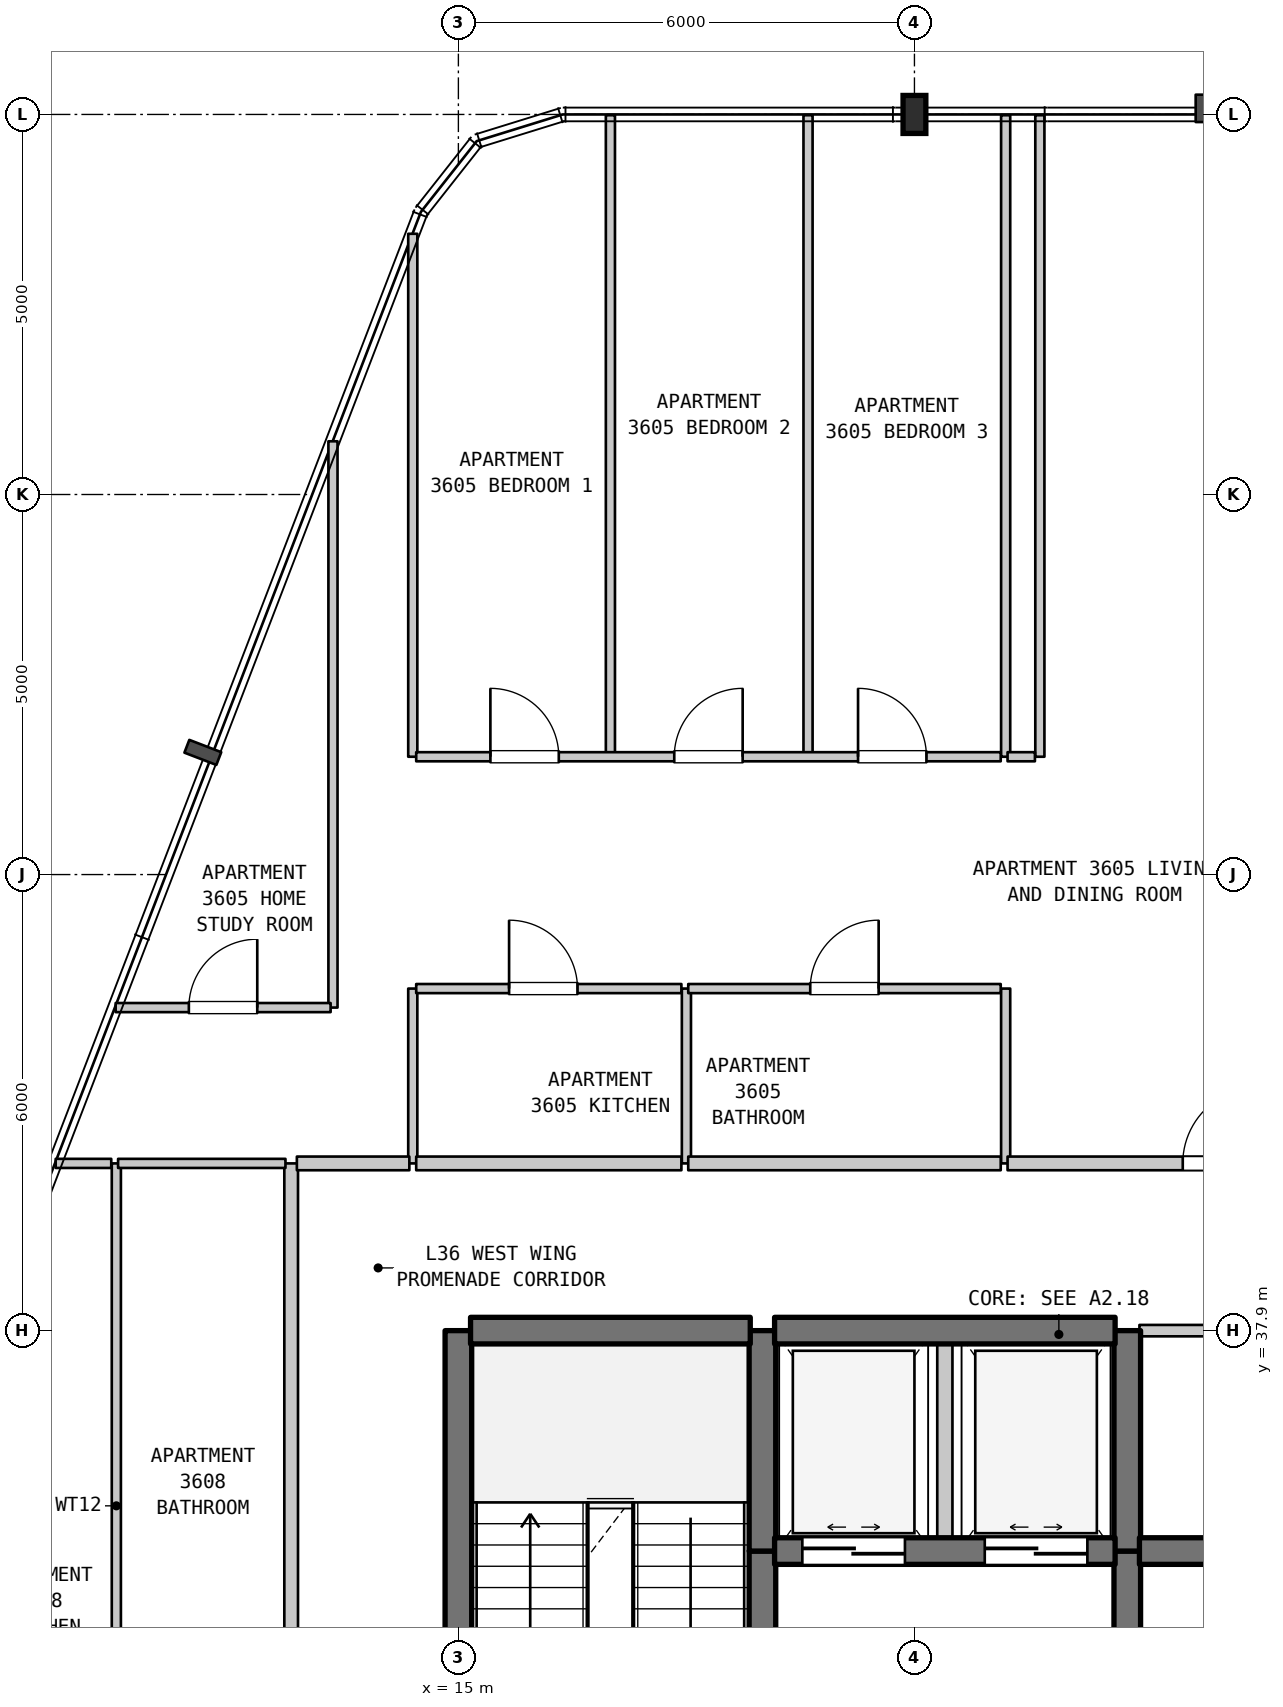
"""IFC4 building model, lengths in metres.
Left out: names, types, materials, properties, quantities, classifications, styles, units other than length and angle.
Written with IfcOpenShell. Run it as: python <this file> out.ifc"""

import sys

from ifc_helpers import new_model, si_unit, direction, frame, frame_2d, origin, origin_2d, place, context, subcontext, project, spatial, rectangle, i_section, extrude, element, fill, save


model = new_model("IFC4")
c1 = context("Model", 3, precision=1e-05, world=origin(), true_north=direction((0.0, 1.0)))
c2 = subcontext(c1, "Body", "Model", "MODEL_VIEW")
j1 = project(units=[si_unit("LENGTHUNIT", "METRE"), si_unit("PLANEANGLEUNIT", "RADIAN")], contexts=[c1])
p1 = place(None, origin())
s1 = spatial("IfcSite", under=j1, at=p1, CompositionType="ELEMENT")
p2 = place(p1, origin())
s2 = spatial("IfcBuilding", under=s1, at=p2, CompositionType="ELEMENT")
p3 = place(p2, frame((0.0, 0.0, 148.3)))
s3 = spatial("IfcBuildingStorey", under=s2, at=p3, CompositionType="ELEMENT", Elevation=148.3)
p4 = place(p3, frame((21.0, 53.9, 0.0), z_axis=(0.0, 0.0, 1.0), x_axis=(1.0, 0.0, 0.0)))
e1 = element("IfcColumn", 1, at=p4, inside=s3, PredefinedType="COLUMN", context=c2, shape_type="SweptSolid", body=[
    extrude(i_section(OverallWidth=0.3, OverallDepth=0.5, WebThickness=0.014, FlangeThickness=0.028, FilletRadius=0.027, at=origin_2d()), origin(), (0.0, 0.0, 1.0), 3.7),
])
p5 = place(p3, frame((10.5, 31.09, 0.0), z_axis=(0.0, 0.0, 1.0), x_axis=(0.0, 1.0, 0.0)))
e2 = element("IfcWall", 2, at=p5, inside=s3, PredefinedType="PARTITIONING", context=c2, shape_type="SweptSolid", body=[
    extrude(rectangle(XDim=9.01, YDim=0.12, at=frame_2d((4.505, 0.0))), origin(), (0.0, 0.0, 1.0), 3.385),
])
p6 = place(p3, frame((12.8, 31.09, 0.0), z_axis=(0.0, 0.0, 1.0), x_axis=(0.0, 1.0, 0.0)))
e3 = element("IfcWall", 3, at=p6, inside=s3, PredefinedType="STANDARD", context=c2, shape_type="SweptSolid", body=[
    extrude(rectangle(XDim=9.01, YDim=0.18, at=frame_2d((4.505, 0.0))), origin(), (0.0, 0.0, 1.0), 3.385),
])
p7 = place(p3, frame((13.35, 42.15, 0.0), z_axis=(0.0, 0.0, 1.0), x_axis=(0.0, 1.0, 0.0)))
e4 = element("IfcWall", 4, at=p7, inside=s3, PredefinedType="PARTITIONING", context=c2, shape_type="SweptSolid", body=[
    extrude(rectangle(XDim=7.45, YDim=0.12, at=frame_2d((3.725, 0.0))), origin(), (0.0, 0.0, 1.0), 3.385),
])
p8 = place(p3, frame((14.4, 40.1, 0.0), z_axis=(0.0, 0.0, 1.0), x_axis=(0.0, 1.0, 0.0)))
e5 = element("IfcWall", 5, at=p8, inside=s3, PredefinedType="PARTITIONING", context=c2, shape_type="SweptSolid", body=[
    extrude(rectangle(XDim=2.3, YDim=0.12, at=frame_2d((1.15, 0.0))), origin(), (0.0, 0.0, 1.0), 3.385),
])
p9 = place(p3, frame((14.4, 45.45, 0.0), z_axis=(0.0, 0.0, 1.0), x_axis=(0.0, 1.0, 0.0)))
e6 = element("IfcWall", 6, at=p9, inside=s3, PredefinedType="PARTITIONING", context=c2, shape_type="SweptSolid", body=[
    extrude(rectangle(XDim=6.88, YDim=0.12, at=frame_2d((3.44, 0.0))), origin(), (0.0, 0.0, 1.0), 3.385),
])
p10 = place(p3, frame((15.0, 31.1, 0.0), z_axis=(0.0, 0.0, 1.0), x_axis=(0.0, 1.0, 0.0)))
e7 = element("IfcWall", 7, at=p10, inside=s3, PredefinedType="SHEAR", context=c2, shape_type="SweptSolid", body=[
    extrude(rectangle(XDim=6.8, YDim=0.35, at=frame_2d((3.4, 0.0))), origin(), (0.0, 0.0, 1.0), 3.385),
])
p11 = place(p3, frame((17.0, 45.45, 0.0), z_axis=(0.0, 0.0, 1.0), x_axis=(0.0, 1.0, 0.0)))
e8 = element("IfcWall", 8, at=p11, inside=s3, PredefinedType="PARTITIONING", context=c2, shape_type="SweptSolid", body=[
    extrude(rectangle(XDim=8.44, YDim=0.12, at=frame_2d((4.22, 0.0))), origin(), (0.0, 0.0, 1.0), 3.385),
])
p12 = place(p3, frame((18.0, 40.1, 0.0), z_axis=(0.0, 0.0, 1.0), x_axis=(0.0, 1.0, 0.0)))
e9 = element("IfcWall", 9, at=p12, inside=s3, PredefinedType="PARTITIONING", context=c2, shape_type="SweptSolid", body=[
    extrude(rectangle(XDim=2.3, YDim=0.12, at=frame_2d((1.15, 0.0))), origin(), (0.0, 0.0, 1.0), 3.385),
])
p13 = place(p3, frame((19.0, 29.5, 0.0), z_axis=(0.0, 0.0, 1.0), x_axis=(0.0, 1.0, 0.0)))
e10 = element("IfcWall", 10, at=p13, inside=s3, PredefinedType="SHEAR", context=c2, shape_type="SweptSolid", body=[
    extrude(rectangle(XDim=5.5, YDim=0.35, at=frame_2d((2.75, 0.0))), origin(), (0.0, 0.0, 1.0), 3.385),
])
p14 = place(p13, frame((2.025, 0.0, 0.0)))
e11 = element("IfcOpeningElement", 11, at=p14, cuts=e10, PredefinedType="OPENING", context=c2, shape_type="SweptSolid", body=[
    extrude(rectangle(XDim=1.1, YDim=2.15, at=frame_2d((0.55, 1.075))), frame((0.0, 0.185, 0.0), z_axis=(0.0, -1.0, 0.0), x_axis=(1.0, 0.0, 0.0)), (0.0, 0.0, 1.0), 0.37),
])
p15 = place(p3, frame((19.0, 35.0, 0.0), z_axis=(0.0, 0.0, 1.0), x_axis=(0.0, 1.0, 0.0)))
e12 = element("IfcWall", 12, at=p15, inside=s3, PredefinedType="SHEAR", context=c2, shape_type="SweptSolid", body=[
    extrude(rectangle(XDim=2.9, YDim=0.35, at=frame_2d((1.45, 0.0))), origin(), (0.0, 0.0, 1.0), 3.385),
])
p16 = place(p3, frame((19.6, 45.45, 0.0), z_axis=(0.0, 0.0, 1.0), x_axis=(0.0, 1.0, 0.0)))
e13 = element("IfcWall", 13, at=p16, inside=s3, PredefinedType="PARTITIONING", context=c2, shape_type="SweptSolid", body=[
    extrude(rectangle(XDim=8.44, YDim=0.12, at=frame_2d((4.22, 0.0))), origin(), (0.0, 0.0, 1.0), 3.385),
])
p17 = place(p3, frame((21.4, 35.0, 0.0), z_axis=(0.0, 0.0, 1.0), x_axis=(0.0, 1.0, 0.0)))
e14 = element("IfcWall", 14, at=p17, inside=s3, PredefinedType="STANDARD", context=c2, shape_type="SweptSolid", body=[
    extrude(rectangle(XDim=2.9, YDim=0.2, at=frame_2d((1.45, 0.0))), origin(), (0.0, 0.0, 1.0), 3.385),
])
p18 = place(p3, frame((22.2, 40.1, 0.0), z_axis=(0.0, 0.0, 1.0), x_axis=(0.0, 1.0, 0.0)))
e15 = element("IfcWall", 15, at=p18, inside=s3, PredefinedType="PARTITIONING", context=c2, shape_type="SweptSolid", body=[
    extrude(rectangle(XDim=2.3, YDim=0.12, at=frame_2d((1.15, 0.0))), origin(), (0.0, 0.0, 1.0), 3.385),
])
for number, where, z_axis, x_axis in (
    (16, (22.2, 45.45, 0.0), (0.0, 0.0, 1.0), (0.0, 1.0, 0.0)),
    (17, (22.65, 45.45, 0.0), (0.0, 0.0, 1.0), (0.0, 1.0, 0.0)),
):
    element("IfcWall", number, at=place(p3, frame(where, z_axis=z_axis, x_axis=x_axis)), inside=s3, PredefinedType="PARTITIONING", context=c2, shape_type="SweptSolid", body=[
        extrude(rectangle(XDim=8.44, YDim=0.12, at=frame_2d((4.22, 0.0))), origin(), (0.0, 0.0, 1.0), 3.385),
    ])
p19 = place(p3, frame((23.8, 31.5, 0.0), z_axis=(0.0, 0.0, 1.0), x_axis=(0.0, 1.0, 0.0)))
e18 = element("IfcWall", 18, at=p19, inside=s3, PredefinedType="SHEAR", context=c2, shape_type="SweptSolid", body=[
    extrude(rectangle(XDim=3.5, YDim=0.35, at=frame_2d((1.75, 0.0))), origin(), (0.0, 0.0, 1.0), 3.385),
])
p20 = place(p19, frame((1.127, 0.0, 0.0)))
e19 = element("IfcOpeningElement", 19, at=p20, cuts=e18, PredefinedType="OPENING", context=c2, shape_type="SweptSolid", body=[
    extrude(rectangle(XDim=1.1, YDim=2.15, at=frame_2d((0.55, 1.075))), frame((0.0, 0.185, 0.0), z_axis=(0.0, -1.0, 0.0), x_axis=(1.0, 0.0, 0.0)), (0.0, 0.0, 1.0), 0.37),
])
p21 = place(p3, frame((23.8, 35.0, 0.0), z_axis=(0.0, 0.0, 1.0), x_axis=(0.0, 1.0, 0.0)))
e20 = element("IfcWall", 20, at=p21, inside=s3, PredefinedType="SHEAR", context=c2, shape_type="SweptSolid", body=[
    extrude(rectangle(XDim=2.9, YDim=0.35, at=frame_2d((1.45, 0.0))), origin(), (0.0, 0.0, 1.0), 3.385),
])
p22 = place(p3, frame((19.16, 35.0, 0.0), z_axis=(0.0, 0.0, 1.0), x_axis=(1.0, 0.0, 0.0)))
e21 = element("IfcWall", 21, at=p22, inside=s3, PredefinedType="SHEAR", context=c2, shape_type="SweptSolid", body=[
    extrude(rectangle(XDim=4.48, YDim=0.35, at=frame_2d((2.24, 0.0))), origin(), (0.0, 0.0, 1.0), 3.385),
])
p23 = place(p22, frame((0.365, 0.0, 0.0)))
e22 = element("IfcOpeningElement", 22, at=p23, cuts=e21, PredefinedType="OPENING", context=c2, shape_type="SweptSolid", body=[
    extrude(rectangle(XDim=1.35, YDim=2.2, at=frame_2d((0.675, 1.1))), frame((0.0, 0.185, 0.0), z_axis=(0.0, -1.0, 0.0), x_axis=(1.0, 0.0, 0.0)), (0.0, 0.0, 1.0), 0.37),
])
p24 = place(p22, frame((2.765, 0.0, 0.0)))
e23 = element("IfcOpeningElement", 23, at=p24, cuts=e21, PredefinedType="OPENING", context=c2, shape_type="SweptSolid", body=[
    extrude(rectangle(XDim=1.35, YDim=2.2, at=frame_2d((0.675, 1.1))), frame((0.0, 0.185, 0.0), z_axis=(0.0, -1.0, 0.0), x_axis=(1.0, 0.0, 0.0)), (0.0, 0.0, 1.0), 0.37),
])
p25 = place(p3, frame((23.96, 35.0, 0.0), z_axis=(0.0, 0.0, 1.0), x_axis=(1.0, 0.0, 0.0)))
e24 = element("IfcWall", 24, at=p25, inside=s3, PredefinedType="SHEAR", context=c2, shape_type="SweptSolid", body=[
    extrude(rectangle(XDim=3.995, YDim=0.35, at=frame_2d((1.998, 0.0))), origin(), (0.0, 0.0, 1.0), 3.385),
])
p26 = place(p25, frame((1.393, 0.0, 0.0)))
e25 = element("IfcOpeningElement", 25, at=p26, cuts=e24, PredefinedType="OPENING", context=c2, shape_type="SweptSolid", body=[
    extrude(rectangle(XDim=0.95, YDim=2.15, at=frame_2d((0.475, 1.075))), frame((0.0, 0.185, 0.0), z_axis=(0.0, -1.0, 0.0), x_axis=(1.0, 0.0, 0.0)), (0.0, 0.0, 1.0), 0.37),
])
p27 = place(p3, frame((15.16, 37.9, 0.0), z_axis=(0.0, 0.0, 1.0), x_axis=(1.0, 0.0, 0.0)))
e26 = element("IfcWall", 26, at=p27, inside=s3, PredefinedType="SHEAR", context=c2, shape_type="SweptSolid", body=[
    extrude(rectangle(XDim=3.68, YDim=0.35, at=frame_2d((1.84, 0.0))), origin(), (0.0, 0.0, 1.0), 3.385),
])
p28 = place(p3, frame((19.16, 37.9, 0.0), z_axis=(0.0, 0.0, 1.0), x_axis=(1.0, 0.0, 0.0)))
e27 = element("IfcWall", 27, at=p28, inside=s3, PredefinedType="SHEAR", context=c2, shape_type="SweptSolid", body=[
    extrude(rectangle(XDim=4.48, YDim=0.35, at=frame_2d((2.24, 0.0))), origin(), (0.0, 0.0, 1.0), 3.385),
])
p29 = place(p3, frame((23.96, 37.9, 0.0), z_axis=(0.0, 0.0, 1.0), x_axis=(1.0, 0.0, 0.0)))
e28 = element("IfcWall", 28, at=p29, inside=s3, PredefinedType="STANDARD", context=c2, shape_type="SweptSolid", body=[
    extrude(rectangle(XDim=3.995, YDim=0.15, at=frame_2d((1.998, 0.0))), origin(), (0.0, 0.0, 1.0), 2.885),
])
p30 = place(p3, frame((9.702, 40.1, 0.0), z_axis=(0.0, 0.0, 1.0), x_axis=(1.0, 0.0, 0.0)))
e29 = element("IfcWall", 29, at=p30, inside=s3, PredefinedType="PARTITIONING", context=c2, shape_type="SweptSolid", body=[
    extrude(rectangle(XDim=0.731, YDim=0.12, at=frame_2d((0.366, 0.0))), origin(), (0.0, 0.0, 1.0), 3.385),
])
p31 = place(p3, frame((10.523, 40.1, 0.0), z_axis=(0.0, 0.0, 1.0), x_axis=(1.0, 0.0, 0.0)))
e30 = element("IfcWall", 30, at=p31, inside=s3, PredefinedType="PARTITIONING", context=c2, shape_type="SweptSolid", body=[
    extrude(rectangle(XDim=2.202, YDim=0.12, at=frame_2d((1.101, 0.0))), origin(), (0.0, 0.0, 1.0), 3.385),
])
p32 = place(p3, frame((12.875, 40.1, 0.0), z_axis=(0.0, 0.0, 1.0), x_axis=(1.0, 0.0, 0.0)))
e31 = element("IfcWall", 31, at=p32, inside=s3, PredefinedType="STANDARD", context=c2, shape_type="SweptSolid", body=[
    extrude(rectangle(XDim=1.48, YDim=0.18, at=frame_2d((0.74, 0.0))), origin(), (0.0, 0.0, 1.0), 3.385),
])
p33 = place(p3, frame((14.445, 40.1, 0.0), z_axis=(0.0, 0.0, 1.0), x_axis=(1.0, 0.0, 0.0)))
e32 = element("IfcWall", 32, at=p33, inside=s3, PredefinedType="STANDARD", context=c2, shape_type="SweptSolid", body=[
    extrude(rectangle(XDim=3.489, YDim=0.18, at=frame_2d((1.745, 0.0))), origin(), (0.0, 0.0, 1.0), 3.385),
])
p34 = place(p3, frame((18.024, 40.1, 0.0), z_axis=(0.0, 0.0, 1.0), x_axis=(1.0, 0.0, 0.0)))
e33 = element("IfcWall", 33, at=p34, inside=s3, PredefinedType="STANDARD", context=c2, shape_type="SweptSolid", body=[
    extrude(rectangle(XDim=4.111, YDim=0.18, at=frame_2d((2.056, 0.0))), origin(), (0.0, 0.0, 1.0), 3.385),
])
p35 = place(p3, frame((22.225, 40.1, 0.0), z_axis=(0.0, 0.0, 1.0), x_axis=(1.0, 0.0, 0.0)))
e34 = element("IfcWall", 34, at=p35, inside=s3, PredefinedType="STANDARD", context=c2, shape_type="SweptSolid", body=[
    extrude(rectangle(XDim=10.345, YDim=0.18, at=frame_2d((5.172, 0.0))), origin(), (0.0, 0.0, 1.0), 3.385),
])
p36 = place(p35, frame((2.305, 0.0, 0.0)))
e35 = element("IfcOpeningElement", 35, at=p36, cuts=e34, PredefinedType="OPENING", context=c2, shape_type="SweptSolid", body=[
    extrude(rectangle(XDim=1.0, YDim=2.15, at=frame_2d((0.5, 1.075))), frame((0.0, 0.1, 0.0), z_axis=(0.0, -1.0, 0.0), x_axis=(1.0, 0.0, 0.0)), (0.0, 0.0, 1.0), 0.2),
])
p37 = place(p35, frame((7.235, 0.0, 0.0)))
e36 = element("IfcOpeningElement", 36, at=p37, cuts=e34, PredefinedType="OPENING", context=c2, shape_type="SweptSolid", body=[
    extrude(rectangle(XDim=1.0, YDim=2.15, at=frame_2d((0.5, 1.075))), frame((0.0, 0.1, 0.0), z_axis=(0.0, -1.0, 0.0), x_axis=(1.0, 0.0, 0.0)), (0.0, 0.0, 1.0), 0.2),
])
p38 = place(p3, frame((10.491, 42.15, 0.0), z_axis=(0.0, 0.0, 1.0), x_axis=(1.0, 0.0, 0.0)))
e37 = element("IfcWall", 37, at=p38, inside=s3, PredefinedType="PARTITIONING", context=c2, shape_type="SweptSolid", body=[
    extrude(rectangle(XDim=2.828, YDim=0.12, at=frame_2d((1.414, 0.0))), origin(), (0.0, 0.0, 1.0), 3.385),
])
p39 = place(p38, frame((0.963, 0.0, 0.0)))
e38 = element("IfcOpeningElement", 38, at=p39, cuts=e37, PredefinedType="OPENING", context=c2, shape_type="SweptSolid", body=[
    extrude(rectangle(XDim=0.9, YDim=2.15, at=frame_2d((0.45, 1.075))), frame((0.0, 0.07, 0.0), z_axis=(0.0, -1.0, 0.0), x_axis=(1.0, 0.0, 0.0)), (0.0, 0.0, 1.0), 0.14),
])
p40 = place(p3, frame((14.445, 42.4, 0.0), z_axis=(0.0, 0.0, 1.0), x_axis=(1.0, 0.0, 0.0)))
e39 = element("IfcWall", 39, at=p40, inside=s3, PredefinedType="PARTITIONING", context=c2, shape_type="SweptSolid", body=[
    extrude(rectangle(XDim=3.489, YDim=0.12, at=frame_2d((1.745, 0.0))), origin(), (0.0, 0.0, 1.0), 3.385),
])
p41 = place(p40, frame((1.222, 0.0, 0.0)))
e40 = element("IfcOpeningElement", 40, at=p41, cuts=e39, PredefinedType="OPENING", context=c2, shape_type="SweptSolid", body=[
    extrude(rectangle(XDim=0.9, YDim=2.15, at=frame_2d((0.45, 1.075))), frame((0.0, 0.07, 0.0), z_axis=(0.0, -1.0, 0.0), x_axis=(1.0, 0.0, 0.0)), (0.0, 0.0, 1.0), 0.14),
])
p42 = place(p3, frame((18.024, 42.4, 0.0), z_axis=(0.0, 0.0, 1.0), x_axis=(1.0, 0.0, 0.0)))
e41 = element("IfcWall", 41, at=p42, inside=s3, PredefinedType="PARTITIONING", context=c2, shape_type="SweptSolid", body=[
    extrude(rectangle(XDim=4.111, YDim=0.12, at=frame_2d((2.056, 0.0))), origin(), (0.0, 0.0, 1.0), 3.385),
])
p43 = place(p42, frame((1.605, 0.0, 0.0)))
e42 = element("IfcOpeningElement", 42, at=p43, cuts=e41, PredefinedType="OPENING", context=c2, shape_type="SweptSolid", body=[
    extrude(rectangle(XDim=0.9, YDim=2.1, at=frame_2d((0.45, 1.05))), frame((0.0, 0.07, 0.0), z_axis=(0.0, -1.0, 0.0), x_axis=(1.0, 0.0, 0.0)), (0.0, 0.0, 1.0), 0.14),
])
p44 = place(p3, frame((14.445, 45.45, 0.0), z_axis=(0.0, 0.0, 1.0), x_axis=(1.0, 0.0, 0.0)))
e43 = element("IfcWall", 43, at=p44, inside=s3, PredefinedType="PARTITIONING", context=c2, shape_type="SweptSolid", body=[
    extrude(rectangle(XDim=7.69, YDim=0.12, at=frame_2d((3.845, 0.0))), origin(), (0.0, 0.0, 1.0), 3.385),
])
p45 = place(p44, frame((0.976, 0.0, 0.0)))
e44 = element("IfcOpeningElement", 44, at=p45, cuts=e43, PredefinedType="OPENING", context=c2, shape_type="SweptSolid", body=[
    extrude(rectangle(XDim=0.9, YDim=2.15, at=frame_2d((0.45, 1.075))), frame((0.0, 0.07, 0.0), z_axis=(0.0, -1.0, 0.0), x_axis=(1.0, 0.0, 0.0)), (0.0, 0.0, 1.0), 0.14),
])
p46 = place(p44, frame((3.395, 0.0, 0.0)))
e45 = element("IfcOpeningElement", 45, at=p46, cuts=e43, PredefinedType="OPENING", context=c2, shape_type="SweptSolid", body=[
    extrude(rectangle(XDim=0.9, YDim=2.15, at=frame_2d((0.45, 1.075))), frame((0.0, 0.07, 0.0), z_axis=(0.0, -1.0, 0.0), x_axis=(1.0, 0.0, 0.0)), (0.0, 0.0, 1.0), 0.14),
])
p47 = place(p44, frame((5.813, 0.0, 0.0)))
e46 = element("IfcOpeningElement", 46, at=p47, cuts=e43, PredefinedType="OPENING", context=c2, shape_type="SweptSolid", body=[
    extrude(rectangle(XDim=0.9, YDim=2.15, at=frame_2d((0.45, 1.075))), frame((0.0, 0.07, 0.0), z_axis=(0.0, -1.0, 0.0), x_axis=(1.0, 0.0, 0.0)), (0.0, 0.0, 1.0), 0.14),
])
p48 = place(p3, frame((22.225, 45.45, 0.0), z_axis=(0.0, 0.0, 1.0), x_axis=(1.0, 0.0, 0.0)))
e47 = element("IfcWall", 47, at=p48, inside=s3, PredefinedType="PARTITIONING", context=c2, shape_type="SweptSolid", body=[
    extrude(rectangle(XDim=0.36, YDim=0.12, at=frame_2d((0.18, 0.0))), origin(), (0.0, 0.0, 1.0), 3.385),
])
p49 = place(p23, origin())
e48 = element("IfcDoor", 48, at=p49, inside=s3, OperationType="DOUBLE_DOOR_SLIDING", PredefinedType="DOOR", context=c2, shape_type="SweptSolid", body=[
    extrude(rectangle(XDim=1.35, YDim=2.2, at=frame_2d((0.675, 1.1))), frame((0.0, 0.025, 0.0), z_axis=(0.0, -1.0, 0.0), x_axis=(1.0, 0.0, 0.0)), (0.0, 0.0, 1.0), 0.05),
])
fill(e22, e48)
p50 = place(p24, origin())
e49 = element("IfcDoor", 49, at=p50, inside=s3, OperationType="DOUBLE_DOOR_SLIDING", PredefinedType="DOOR", context=c2, shape_type="SweptSolid", body=[
    extrude(rectangle(XDim=1.35, YDim=2.2, at=frame_2d((0.675, 1.1))), frame((0.0, 0.025, 0.0), z_axis=(0.0, -1.0, 0.0), x_axis=(1.0, 0.0, 0.0)), (0.0, 0.0, 1.0), 0.05),
])
fill(e23, e49)
p51 = place(p36, origin())
e50 = element("IfcDoor", 50, at=p51, inside=s3, OperationType="SINGLE_SWING_RIGHT", PredefinedType="DOOR", context=c2, shape_type="SweptSolid", body=[
    extrude(rectangle(XDim=1.0, YDim=2.15, at=frame_2d((0.5, 1.075))), frame((0.0, 0.025, 0.0), z_axis=(0.0, -1.0, 0.0), x_axis=(1.0, 0.0, 0.0)), (0.0, 0.0, 1.0), 0.05),
])
fill(e35, e50)
p52 = place(p39, origin())
e51 = element("IfcDoor", 51, at=p52, inside=s3, OperationType="SINGLE_SWING_RIGHT", PredefinedType="DOOR", context=c2, shape_type="SweptSolid", body=[
    extrude(rectangle(XDim=0.9, YDim=2.15, at=frame_2d((0.45, 1.075))), frame((0.0, 0.025, 0.0), z_axis=(0.0, -1.0, 0.0), x_axis=(1.0, 0.0, 0.0)), (0.0, 0.0, 1.0), 0.05),
])
fill(e38, e51)
p53 = place(p41, origin())
e52 = element("IfcDoor", 52, at=p53, inside=s3, OperationType="SINGLE_SWING_LEFT", PredefinedType="DOOR", context=c2, shape_type="SweptSolid", body=[
    extrude(rectangle(XDim=0.9, YDim=2.15, at=frame_2d((0.45, 1.075))), frame((0.0, 0.025, 0.0), z_axis=(0.0, -1.0, 0.0), x_axis=(1.0, 0.0, 0.0)), (0.0, 0.0, 1.0), 0.05),
])
fill(e40, e52)
p54 = place(p43, origin())
e53 = element("IfcDoor", 53, at=p54, inside=s3, OperationType="SINGLE_SWING_RIGHT", PredefinedType="DOOR", context=c2, shape_type="SweptSolid", body=[
    extrude(rectangle(XDim=0.9, YDim=2.1, at=frame_2d((0.45, 1.05))), frame((0.0, 0.025, 0.0), z_axis=(0.0, -1.0, 0.0), x_axis=(1.0, 0.0, 0.0)), (0.0, 0.0, 1.0), 0.05),
])
fill(e42, e53)
p55 = place(p45, origin())
e54 = element("IfcDoor", 54, at=p55, inside=s3, OperationType="SINGLE_SWING_LEFT", PredefinedType="DOOR", context=c2, shape_type="SweptSolid", body=[
    extrude(rectangle(XDim=0.9, YDim=2.15, at=frame_2d((0.45, 1.075))), frame((0.0, 0.025, 0.0), z_axis=(0.0, -1.0, 0.0), x_axis=(1.0, 0.0, 0.0)), (0.0, 0.0, 1.0), 0.05),
])
fill(e44, e54)
p56 = place(p46, origin())
e55 = element("IfcDoor", 55, at=p56, inside=s3, OperationType="SINGLE_SWING_RIGHT", PredefinedType="DOOR", context=c2, shape_type="SweptSolid", body=[
    extrude(rectangle(XDim=0.9, YDim=2.15, at=frame_2d((0.45, 1.075))), frame((0.0, 0.025, 0.0), z_axis=(0.0, -1.0, 0.0), x_axis=(1.0, 0.0, 0.0)), (0.0, 0.0, 1.0), 0.05),
])
fill(e45, e55)
p57 = place(p47, origin())
e56 = element("IfcDoor", 56, at=p57, inside=s3, OperationType="SINGLE_SWING_LEFT", PredefinedType="DOOR", context=c2, shape_type="SweptSolid", body=[
    extrude(rectangle(XDim=0.9, YDim=2.15, at=frame_2d((0.45, 1.075))), frame((0.0, 0.025, 0.0), z_axis=(0.0, -1.0, 0.0), x_axis=(1.0, 0.0, 0.0)), (0.0, 0.0, 1.0), 0.05),
])
fill(e46, e56)
save(model, sys.argv[1])
